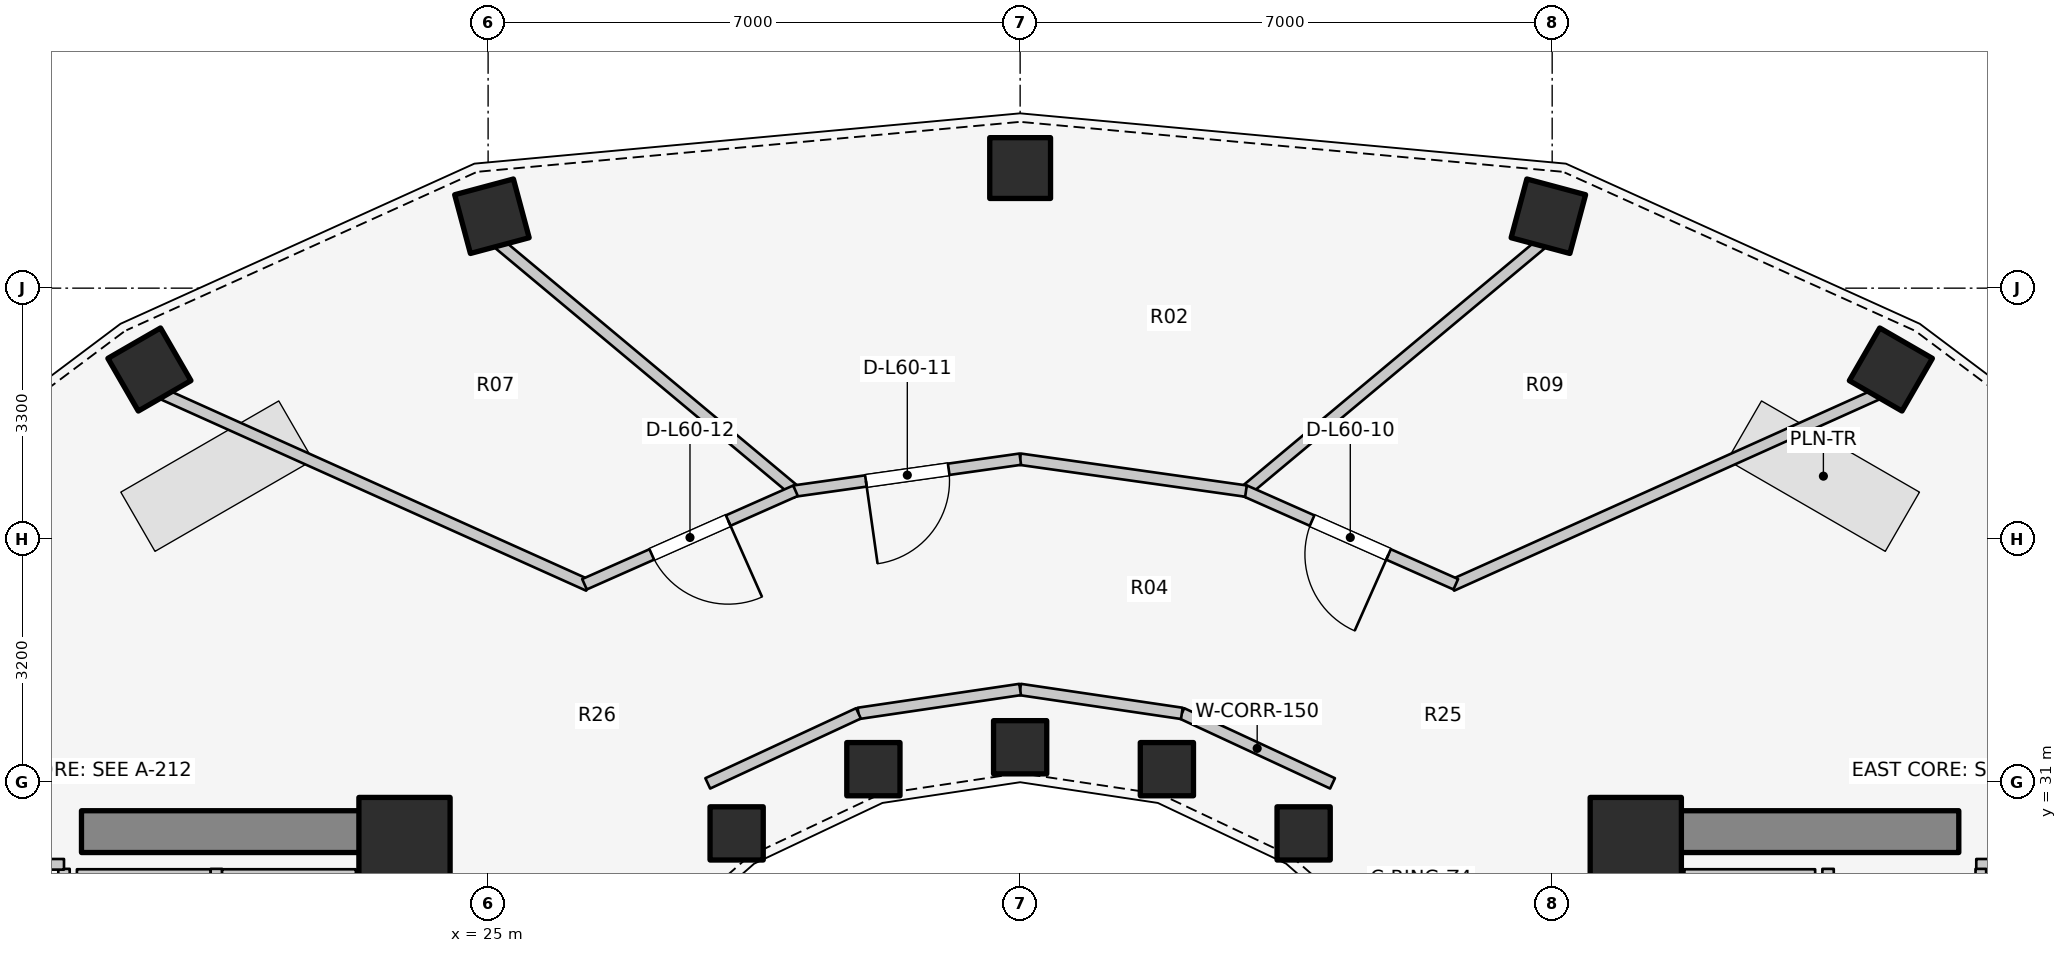
"""IFC4 building model, lengths in metres.
Left out: names, types, materials, properties, quantities, classifications, styles, units other than length and angle.
Written with IfcOpenShell. Run it as: python <this file> out.ifc"""

import sys

from ifc_helpers import new_model, si_unit, direction, frame, frame_2d, origin, origin_2d, place, context, subcontext, project, spatial, rectangle, extrude, element, fill, save


model = new_model("IFC4")
c1 = context("Model", 3, precision=1e-05, world=origin(), true_north=direction((0.0, 1.0)))
c2 = subcontext(c1, "Body", "Model", "MODEL_VIEW")
j1 = project(units=[si_unit("LENGTHUNIT", "METRE"), si_unit("PLANEANGLEUNIT", "RADIAN")], contexts=[c1])
p1 = place(None, origin())
s1 = spatial("IfcSite", under=j1, at=p1, CompositionType="ELEMENT")
p2 = place(p1, origin())
s2 = spatial("IfcBuilding", under=s1, at=p2, CompositionType="ELEMENT")
p3 = place(p2, frame((0.0, 0.0, 197.4)))
s3 = spatial("IfcBuildingStorey", under=s2, at=p3, CompositionType="ELEMENT", Elevation=197.4)
for number, where, z_axis, x_axis in (
    (1, (19.65, 30.35, 0.0), (0.0, 0.0, 1.0), (1.0, 0.0, 0.0)),
    (2, (39.85, 30.35, 0.0), (0.0, 0.0, 1.0), (1.0, 0.0, 0.0)),
):
    element("IfcWall", number, at=place(p3, frame(where, z_axis=z_axis, x_axis=x_axis)), inside=s3, PredefinedType="SHEAR", context=c2, shape_type="SweptSolid", body=[
        extrude(rectangle(XDim=4.5, YDim=0.55, at=frame_2d((2.25, 0.0))), origin(), (0.0, 0.0, 1.0), 4.2),
    ])
for number, where, z_axis, x_axis in (
    (3, (23.9, 30.2, 0.0), (0.0, 0.0, 1.0), (1.0, 0.0, 0.0)),
    (4, (40.1, 30.2, 0.0), (0.0, 0.0, 1.0), (1.0, 0.0, 0.0)),
):
    element("IfcColumn", number, at=place(p3, frame(where, z_axis=z_axis, x_axis=x_axis)), inside=s3, PredefinedType="COLUMN", context=c2, shape_type="SweptSolid", body=[
        extrude(rectangle(XDim=1.2, YDim=1.2, at=origin_2d()), origin(), (0.0, 0.0, 1.0), 4.2),
    ])
p4 = place(p3, frame((35.73, 30.327, 0.0), z_axis=(0.0, 0.0, 1.0), x_axis=(1.0, 0.0, 0.0)))
e5 = element("IfcColumn", 5, at=p4, inside=s3, PredefinedType="COLUMN", context=c2, shape_type="SweptSolid", body=[
    extrude(rectangle(XDim=0.7, YDim=0.7, at=origin_2d()), origin(), (0.0, 0.0, 1.0), 4.2),
])
p5 = place(p3, frame((43.456, 36.43, 0.0), z_axis=(0.0, 0.0, 1.0), x_axis=(0.5, 0.866025403784, 0.0)))
e6 = element("IfcColumn", 6, at=p5, inside=s3, PredefinedType="COLUMN", context=c2, shape_type="SweptSolid", body=[
    extrude(rectangle(XDim=0.8, YDim=0.8, at=origin_2d()), origin(), (0.0, 0.0, 1.0), 4.2),
])
p6 = place(p3, frame((33.931, 31.172, 0.0), z_axis=(0.0, 0.0, 1.0), x_axis=(1.0, 0.0, 0.0)))
e7 = element("IfcColumn", 7, at=p6, inside=s3, PredefinedType="COLUMN", context=c2, shape_type="SweptSolid", body=[
    extrude(rectangle(XDim=0.7, YDim=0.7, at=origin_2d()), origin(), (0.0, 0.0, 1.0), 4.2),
])
p7 = place(p3, frame((38.95, 38.446, 0.0), z_axis=(0.0, 0.0, 1.0), x_axis=(0.258819045103, 0.965925826289, 0.0)))
e8 = element("IfcColumn", 8, at=p7, inside=s3, PredefinedType="COLUMN", context=c2, shape_type="SweptSolid", body=[
    extrude(rectangle(XDim=0.8, YDim=0.8, at=origin_2d()), origin(), (0.0, 0.0, 1.0), 4.2),
])
p8 = place(p3, frame((32.0, 31.46, 0.0), z_axis=(0.0, 0.0, 1.0), x_axis=(1.0, 0.0, 0.0)))
e9 = element("IfcColumn", 9, at=p8, inside=s3, PredefinedType="COLUMN", context=c2, shape_type="SweptSolid", body=[
    extrude(rectangle(XDim=0.7, YDim=0.7, at=origin_2d()), origin(), (0.0, 0.0, 1.0), 4.2),
])
p9 = place(p3, frame((32.0, 39.08, 0.0), z_axis=(0.0, 0.0, 1.0), x_axis=(0.0, 1.0, 0.0)))
e10 = element("IfcColumn", 10, at=p9, inside=s3, PredefinedType="COLUMN", context=c2, shape_type="SweptSolid", body=[
    extrude(rectangle(XDim=0.8, YDim=0.8, at=origin_2d()), origin(), (0.0, 0.0, 1.0), 4.2),
])
p10 = place(p3, frame((30.069, 31.172, 0.0), z_axis=(0.0, 0.0, 1.0), x_axis=(1.0, 0.0, 0.0)))
e11 = element("IfcColumn", 11, at=p10, inside=s3, PredefinedType="COLUMN", context=c2, shape_type="SweptSolid", body=[
    extrude(rectangle(XDim=0.7, YDim=0.7, at=origin_2d()), origin(), (0.0, 0.0, 1.0), 4.2),
])
p11 = place(p3, frame((25.05, 38.446, 0.0), z_axis=(0.0, 0.0, 1.0), x_axis=(-0.258819045103, 0.965925826289, 0.0)))
e12 = element("IfcColumn", 12, at=p11, inside=s3, PredefinedType="COLUMN", context=c2, shape_type="SweptSolid", body=[
    extrude(rectangle(XDim=0.8, YDim=0.8, at=origin_2d()), origin(), (0.0, 0.0, 1.0), 4.2),
])
p12 = place(p3, frame((28.27, 30.327, 0.0), z_axis=(0.0, 0.0, 1.0), x_axis=(1.0, 0.0, 0.0)))
e13 = element("IfcColumn", 13, at=p12, inside=s3, PredefinedType="COLUMN", context=c2, shape_type="SweptSolid", body=[
    extrude(rectangle(XDim=0.7, YDim=0.7, at=origin_2d()), origin(), (0.0, 0.0, 1.0), 4.2),
])
p13 = place(p3, frame((20.544, 36.43, 0.0), z_axis=(0.0, 0.0, 1.0), x_axis=(-0.5, 0.866025403784, 0.0)))
e14 = element("IfcColumn", 14, at=p13, inside=s3, PredefinedType="COLUMN", context=c2, shape_type="SweptSolid", body=[
    extrude(rectangle(XDim=0.8, YDim=0.8, at=origin_2d()), origin(), (0.0, 0.0, 1.0), 4.2),
])
p14 = place(p3, frame((19.59, 29.78, 0.0), z_axis=(0.0, 0.0, 1.0), x_axis=(1.0, 0.0, 0.0)))
e15 = element("IfcWall", 15, at=p14, inside=s3, PredefinedType="SOLIDWALL", context=c2, shape_type="SweptSolid", body=[
    extrude(rectangle(XDim=1.76, YDim=0.15, at=frame_2d((0.88, 0.0))), origin(), (0.0, 0.0, 1.0), 3.675),
])
for number, where, z_axis, x_axis in (
    (16, (19.42, 27.14, 0.0), (0.0, 0.0, 1.0), (0.0, 1.0, 0.0)),
    (17, (21.425, 27.14, 0.0), (0.0, 0.0, 1.0), (0.0, 1.0, 0.0)),
):
    element("IfcWall", number, at=place(p3, frame(where, z_axis=z_axis, x_axis=x_axis)), inside=s3, PredefinedType="SOLIDWALL", context=c2, shape_type="SweptSolid", body=[
        extrude(rectangle(XDim=2.72, YDim=0.15, at=frame_2d((1.36, 0.0))), origin(), (0.0, 0.0, 1.0), 3.675),
    ])
p15 = place(p3, frame((21.5, 29.78, 0.0), z_axis=(0.0, 0.0, 1.0), x_axis=(1.0, 0.0, 0.0)))
e18 = element("IfcWall", 18, at=p15, inside=s3, PredefinedType="SOLIDWALL", context=c2, shape_type="SweptSolid", body=[
    extrude(rectangle(XDim=1.76, YDim=0.15, at=frame_2d((0.88, 0.0))), origin(), (0.0, 0.0, 1.0), 3.675),
])
p16 = place(p3, frame((23.43, 27.14, 0.0), z_axis=(0.0, 0.0, 1.0), x_axis=(0.0, 1.0, 0.0)))
e19 = element("IfcWall", 19, at=p16, inside=s3, PredefinedType="SOLIDWALL", context=c2, shape_type="SweptSolid", body=[
    extrude(rectangle(XDim=2.72, YDim=0.15, at=frame_2d((1.36, 0.0))), origin(), (0.0, 0.0, 1.0), 3.675),
])
p17 = place(p3, frame((40.74, 29.78, 0.0), z_axis=(0.0, 0.0, 1.0), x_axis=(1.0, 0.0, 0.0)))
e20 = element("IfcWall", 20, at=p17, inside=s3, PredefinedType="SOLIDWALL", context=c2, shape_type="SweptSolid", body=[
    extrude(rectangle(XDim=1.72, YDim=0.15, at=frame_2d((0.86, 0.0))), origin(), (0.0, 0.0, 1.0), 3.675),
])
for number, where, z_axis, x_axis in (
    (21, (40.57, 27.14, 0.0), (0.0, 0.0, 1.0), (0.0, 1.0, 0.0)),
    (22, (42.63, 27.14, 0.0), (0.0, 0.0, 1.0), (0.0, 1.0, 0.0)),
):
    element("IfcWall", number, at=place(p3, frame(where, z_axis=z_axis, x_axis=x_axis)), inside=s3, PredefinedType="SOLIDWALL", context=c2, shape_type="SweptSolid", body=[
        extrude(rectangle(XDim=2.72, YDim=0.15, at=frame_2d((1.36, 0.0))), origin(), (0.0, 0.0, 1.0), 3.675),
    ])
p18 = place(p3, frame((36.11, 30.985, 0.0), z_axis=(0.0, 0.0, 1.0), x_axis=(-0.906943449489, 0.421252393975, 0.0)))
e23 = element("IfcWall", 23, at=p18, inside=s3, PredefinedType="PARTITIONING", context=c2, shape_type="SweptSolid", body=[
    extrude(rectangle(XDim=2.186, YDim=0.15, at=frame_2d((1.093, 0.0))), origin(), (0.0, 0.0, 1.0), 2.32),
])
for number, where, z_axis, x_axis in (
    (24, (34.127, 31.906, 0.0), (0.0, 0.0, 1.0), (-0.989, 0.146, 0.0)),
    (25, (32.0, 32.22, 0.0), (0.0, 0.0, 1.0), (-0.989, -0.146, 0.0)),
):
    element("IfcWall", number, at=place(p3, frame(where, z_axis=z_axis, x_axis=x_axis)), inside=s3, PredefinedType="PARTITIONING", context=c2, shape_type="SweptSolid", body=[
        extrude(rectangle(XDim=2.151, YDim=0.15, at=frame_2d((1.075, 0.0))), origin(), (0.0, 0.0, 1.0), 2.32),
    ])
p19 = place(p3, frame((29.873, 31.906, 0.0), z_axis=(0.0, 0.0, 1.0), x_axis=(-0.906943449489, -0.421252393975, 0.0)))
e26 = element("IfcWall", 26, at=p19, inside=s3, PredefinedType="PARTITIONING", context=c2, shape_type="SweptSolid", body=[
    extrude(rectangle(XDim=2.186, YDim=0.15, at=frame_2d((1.093, 0.0))), origin(), (0.0, 0.0, 1.0), 2.32),
])
p20 = place(p3, frame((37.679, 33.588, 0.0), z_axis=(0.0, 0.0, 1.0), x_axis=(0.912031098102, 0.410121050538, 0.0)))
e27 = element("IfcWall", 27, at=p20, inside=s3, PredefinedType="PARTITIONING", context=c2, shape_type="SweptSolid", body=[
    extrude(rectangle(XDim=6.125, YDim=0.15, at=frame_2d((3.063, 0.0))), origin(), (0.0, 0.0, 1.0), 2.32),
])
p21 = place(p3, frame((34.925, 34.801, 0.0), z_axis=(0.0, 0.0, 1.0), x_axis=(0.767598896653, 0.640930521865, 0.0)))
e28 = element("IfcWall", 28, at=p21, inside=s3, PredefinedType="PARTITIONING", context=c2, shape_type="SweptSolid", body=[
    extrude(rectangle(XDim=5.115, YDim=0.15, at=frame_2d((2.558, 0.0))), origin(), (0.0, 0.0, 1.0), 2.32),
])
p22 = place(p3, frame((37.732, 33.604, 0.0), z_axis=(0.0, 0.0, 1.0), x_axis=(-0.914251978061, 0.405146048496, 0.0)))
e29 = element("IfcWall", 29, at=p22, inside=s3, PredefinedType="PARTITIONING", context=c2, shape_type="SweptSolid", body=[
    extrude(rectangle(XDim=3.036, YDim=0.15, at=frame_2d((1.518, 0.0))), origin(), (0.0, 0.0, 1.0), 2.32),
])
p23 = place(p22, frame((0.968, 0.0, 0.0)))
e30 = element("IfcOpeningElement", 30, at=p23, cuts=e29, PredefinedType="OPENING", context=c2, shape_type="SweptSolid", body=[
    extrude(rectangle(XDim=1.1, YDim=2.1, at=frame_2d((0.55, 1.05))), frame((0.0, 0.085, 0.0), z_axis=(0.0, -1.0, 0.0), x_axis=(1.0, 0.0, 0.0)), (0.0, 0.0, 1.0), 0.17),
])
p24 = place(p3, frame((29.075, 34.801, 0.0), z_axis=(0.0, 0.0, 1.0), x_axis=(-0.767598896653, 0.640930521865, 0.0)))
e31 = element("IfcWall", 31, at=p24, inside=s3, PredefinedType="PARTITIONING", context=c2, shape_type="SweptSolid", body=[
    extrude(rectangle(XDim=5.115, YDim=0.15, at=frame_2d((2.558, 0.0))), origin(), (0.0, 0.0, 1.0), 2.32),
])
p25 = place(p3, frame((34.971, 34.83, 0.0), z_axis=(0.0, 0.0, 1.0), x_axis=(-0.990183914421, 0.139770582106, 0.0)))
e32 = element("IfcWall", 32, at=p25, inside=s3, PredefinedType="PARTITIONING", context=c2, shape_type="SweptSolid", body=[
    extrude(rectangle(XDim=3.003, YDim=0.15, at=frame_2d((1.501, 0.0))), origin(), (0.0, 0.0, 1.0), 2.32),
])
p26 = place(p3, frame((32.002, 35.25, 0.0), z_axis=(0.0, 0.0, 1.0), x_axis=(-0.990183914421, -0.139770582106, 0.0)))
e33 = element("IfcWall", 33, at=p26, inside=s3, PredefinedType="PARTITIONING", context=c2, shape_type="SweptSolid", body=[
    extrude(rectangle(XDim=3.003, YDim=0.15, at=frame_2d((1.501, 0.0))), origin(), (0.0, 0.0, 1.0), 2.32),
])
p27 = place(p26, frame((0.951, 0.0, 0.0)))
e34 = element("IfcOpeningElement", 34, at=p27, cuts=e33, PredefinedType="OPENING", context=c2, shape_type="SweptSolid", body=[
    extrude(rectangle(XDim=1.1, YDim=2.1, at=frame_2d((0.55, 1.05))), frame((0.0, 0.085, 0.0), z_axis=(0.0, -1.0, 0.0), x_axis=(1.0, 0.0, 0.0)), (0.0, 0.0, 1.0), 0.17),
])
p28 = place(p3, frame((26.321, 33.588, 0.0), z_axis=(0.0, 0.0, 1.0), x_axis=(-0.912031098102, 0.410121050538, 0.0)))
e35 = element("IfcWall", 35, at=p28, inside=s3, PredefinedType="PARTITIONING", context=c2, shape_type="SweptSolid", body=[
    extrude(rectangle(XDim=6.125, YDim=0.15, at=frame_2d((3.063, 0.0))), origin(), (0.0, 0.0, 1.0), 2.32),
])
p29 = place(p3, frame((29.044, 34.835, 0.0), z_axis=(0.0, 0.0, 1.0), x_axis=(-0.914251978061, -0.405146048496, 0.0)))
e36 = element("IfcWall", 36, at=p29, inside=s3, PredefinedType="PARTITIONING", context=c2, shape_type="SweptSolid", body=[
    extrude(rectangle(XDim=3.036, YDim=0.15, at=frame_2d((1.518, 0.0))), origin(), (0.0, 0.0, 1.0), 2.32),
])
p30 = place(p29, frame((0.968, 0.0, 0.0)))
e37 = element("IfcOpeningElement", 37, at=p30, cuts=e36, PredefinedType="OPENING", context=c2, shape_type="SweptSolid", body=[
    extrude(rectangle(XDim=1.1, YDim=2.1, at=frame_2d((0.55, 1.05))), frame((0.0, 0.085, 0.0), z_axis=(0.0, -1.0, 0.0), x_axis=(1.0, 0.0, 0.0)), (0.0, 0.0, 1.0), 0.17),
])
p31 = place(p3, frame((16.12, 29.92, 0.0), z_axis=(0.0, 0.0, 1.0), x_axis=(1.0, 0.0, 0.0)))
e38 = element("IfcWall", 38, at=p31, inside=s3, PredefinedType="PLUMBINGWALL", context=c2, shape_type="SweptSolid", body=[
    extrude(rectangle(XDim=3.3, YDim=0.14, at=frame_2d((1.65, 0.0))), origin(), (0.0, 0.0, 1.0), 3.675),
])
p32 = place(p31, frame((1.404, 0.0, 0.0)))
e39 = element("IfcOpeningElement", 39, at=p32, cuts=e38, PredefinedType="OPENING", context=c2, shape_type="SweptSolid", body=[
    extrude(rectangle(XDim=0.9, YDim=2.1, at=frame_2d((0.45, 1.05))), frame((0.0, 0.08, 0.0), z_axis=(0.0, -1.0, 0.0), x_axis=(1.0, 0.0, 0.0)), (0.0, 0.0, 1.0), 0.16),
])
p33 = place(p3, frame((44.58, 29.92, 0.0), z_axis=(0.0, 0.0, 1.0), x_axis=(1.0, 0.0, 0.0)))
e40 = element("IfcWall", 40, at=p33, inside=s3, PredefinedType="PLUMBINGWALL", context=c2, shape_type="SweptSolid", body=[
    extrude(rectangle(XDim=3.3, YDim=0.14, at=frame_2d((1.65, 0.0))), origin(), (0.0, 0.0, 1.0), 3.675),
])
p34 = place(p33, frame((1.051, 0.0, 0.0)))
e41 = element("IfcOpeningElement", 41, at=p34, cuts=e40, PredefinedType="OPENING", context=c2, shape_type="SweptSolid", body=[
    extrude(rectangle(XDim=0.85, YDim=2.05, at=frame_2d((0.425, 1.025))), frame((0.0, 0.08, 0.0), z_axis=(0.0, -1.0, 0.0), x_axis=(1.0, 0.0, 0.0)), (0.0, 0.0, 1.0), 0.16),
])
p35 = place(p3, frame((44.64, 25.98, 0.0), z_axis=(0.0, 0.0, 1.0), x_axis=(0.0, 1.0, 0.0)))
e42 = element("IfcWall", 42, at=p35, inside=s3, PredefinedType="PLUMBINGWALL", context=c2, shape_type="SweptSolid", body=[
    extrude(rectangle(XDim=3.88, YDim=0.14, at=frame_2d((1.94, 0.0))), origin(), (0.0, 0.0, 1.0), 3.675),
])
p36 = place(p23, origin())
e43 = element("IfcDoor", 43, at=p36, inside=s3, OperationType="SINGLE_SWING_LEFT", PredefinedType="DOOR", context=c2, shape_type="SweptSolid", body=[
    extrude(rectangle(XDim=1.1, YDim=2.1, at=frame_2d((0.55, 1.05))), frame((0.0, 0.025, 0.0), z_axis=(0.0, -1.0, 0.0), x_axis=(1.0, 0.0, 0.0)), (0.0, 0.0, 1.0), 0.05),
])
fill(e30, e43)
p37 = place(p27, origin())
e44 = element("IfcDoor", 44, at=p37, inside=s3, OperationType="SINGLE_SWING_RIGHT", PredefinedType="DOOR", context=c2, shape_type="SweptSolid", body=[
    extrude(rectangle(XDim=1.1, YDim=2.1, at=frame_2d((0.55, 1.05))), frame((0.0, 0.025, 0.0), z_axis=(0.0, -1.0, 0.0), x_axis=(1.0, 0.0, 0.0)), (0.0, 0.0, 1.0), 0.05),
])
fill(e34, e44)
p38 = place(p30, origin())
e45 = element("IfcDoor", 45, at=p38, inside=s3, OperationType="SINGLE_SWING_LEFT", PredefinedType="DOOR", context=c2, shape_type="SweptSolid", body=[
    extrude(rectangle(XDim=1.1, YDim=2.1, at=frame_2d((0.55, 1.05))), frame((0.0, 0.025, 0.0), z_axis=(0.0, -1.0, 0.0), x_axis=(1.0, 0.0, 0.0)), (0.0, 0.0, 1.0), 0.05),
])
fill(e37, e45)
save(model, sys.argv[1])
